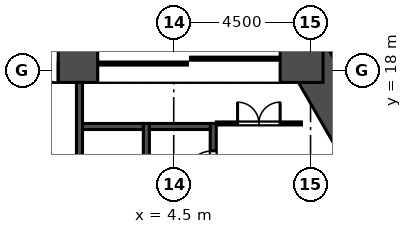
"""IFC4 building model, lengths in metres.
Left out: names, types, materials, properties, quantities, classifications, styles, units other than length and angle.
Written with IfcOpenShell. Run it as: python <this file> out.ifc"""

import sys

from ifc_helpers import new_model, si_unit, direction, frame, frame_2d, origin, place, context, subcontext, project, spatial, rectangle, extrude, element, fill, save


model = new_model("IFC4")
c1 = context("Model", 3, precision=1e-05, world=origin(), true_north=direction((0.0, 1.0)))
c2 = subcontext(c1, "Body", "Model", "MODEL_VIEW")
j1 = project(units=[si_unit("LENGTHUNIT", "METRE"), si_unit("PLANEANGLEUNIT", "RADIAN")], contexts=[c1])
p1 = place(None, origin())
s1 = spatial("IfcSite", under=j1, at=p1, CompositionType="ELEMENT")
p2 = place(p1, origin())
s2 = spatial("IfcBuilding", under=s1, at=p2, CompositionType="ELEMENT")
p3 = place(p2, frame((0.0, 0.0, 25.0)))
s3 = spatial("IfcBuildingStorey", under=s2, at=p3, CompositionType="ELEMENT", Elevation=25.0)
p4 = place(p3, frame((13.394, 10.703, 0.0), z_axis=(0.0, 0.0, 1.0), x_axis=(-0.50000187635, 0.866024320471, 0.0)))
e1 = element("IfcWall", 1, at=p4, inside=s3, PredefinedType="SHEAR", context=c2, shape_type="SweptSolid", body=[
    extrude(rectangle(XDim=9.177, YDim=1.4, at=frame_2d((4.588, 0.0))), origin(), (0.0, 0.0, 1.0), 4.5),
])
p5 = place(p3, frame((9.412, 18.3, 0.0), z_axis=(0.0, 0.0, 1.0), x_axis=(-1.0, 0.0, 0.0)))
e2 = element("IfcWall", 2, at=p5, inside=s3, PredefinedType="SHEAR", context=c2, shape_type="SweptSolid", body=[
    extrude(rectangle(XDim=18.823, YDim=1.4, at=frame_2d((9.412, 0.0))), origin(), (0.0, 0.0, 1.0), 4.5),
])
p6 = place(p5, frame((8.711, 0.0, 0.0)))
e3 = element("IfcOpeningElement", 3, at=p6, cuts=e2, PredefinedType="OPENING", context=c2, shape_type="SweptSolid", body=[
    extrude(rectangle(XDim=1.4, YDim=2.1, at=frame_2d((0.7, 1.05))), frame((0.0, 0.71, 0.0), z_axis=(0.0, -1.0, 0.0), x_axis=(1.0, 0.0, 0.0)), (0.0, 0.0, 1.0), 1.42),
])
p7 = place(p5, frame((11.412, 0.0, 0.0)))
e4 = element("IfcOpeningElement", 4, at=p7, cuts=e2, PredefinedType="OPENING", context=c2, shape_type="SweptSolid", body=[
    extrude(rectangle(XDim=6.0, YDim=2.4, at=frame_2d((3.0, 1.2))), frame((0.0, 0.71, 0.0), z_axis=(0.0, -1.0, 0.0), x_axis=(1.0, 0.0, 0.0)), (0.0, 0.0, 1.0), 1.42),
])
p8 = place(p5, frame((1.412, 0.0, 0.0)))
e5 = element("IfcOpeningElement", 5, at=p8, cuts=e2, PredefinedType="OPENING", context=c2, shape_type="SweptSolid", body=[
    extrude(rectangle(XDim=6.0, YDim=2.4, at=frame_2d((3.0, 1.2))), frame((0.0, 0.71, 0.0), z_axis=(0.0, -1.0, 0.0), x_axis=(1.0, 0.0, 0.0)), (0.0, 0.0, 1.0), 1.42),
])
p9 = place(p3, frame((32.353, 7.709, 0.0), z_axis=(0.0, 0.0, 1.0), x_axis=(-0.500000836325, 0.866024920931, 0.0)))
e6 = element("IfcWall", 6, at=p9, inside=s3, PredefinedType="SOLIDWALL", context=c2, shape_type="SweptSolid", body=[
    extrude(rectangle(XDim=56.0, YDim=0.34, at=frame_2d((28.0, 0.0))), origin(), (0.0, 0.0, 1.0), 4.2),
])
p10 = place(p9, frame((1.5, 0.0, 0.9)))
e7 = element("IfcOpeningElement", 7, at=p10, cuts=e6, PredefinedType="OPENING", context=c2, shape_type="SweptSolid", body=[
    extrude(rectangle(XDim=1.885, YDim=3.0, at=frame_2d((0.942, 1.5))), frame((0.0, 0.18, 0.0), z_axis=(0.0, -1.0, 0.0), x_axis=(1.0, 0.0, 0.0)), (0.0, 0.0, 1.0), 0.36),
])
p11 = place(p9, frame((4.5, 0.0, 0.9)))
e8 = element("IfcOpeningElement", 8, at=p11, cuts=e6, PredefinedType="OPENING", context=c2, shape_type="SweptSolid", body=[
    extrude(rectangle(XDim=1.885, YDim=3.0, at=frame_2d((0.942, 1.5))), frame((0.0, 0.18, 0.0), z_axis=(0.0, -1.0, 0.0), x_axis=(1.0, 0.0, 0.0)), (0.0, 0.0, 1.0), 0.36),
])
p12 = place(p9, frame((7.5, 0.0, 0.9)))
e9 = element("IfcOpeningElement", 9, at=p12, cuts=e6, PredefinedType="OPENING", context=c2, shape_type="SweptSolid", body=[
    extrude(rectangle(XDim=1.885, YDim=3.0, at=frame_2d((0.942, 1.5))), frame((0.0, 0.18, 0.0), z_axis=(0.0, -1.0, 0.0), x_axis=(1.0, 0.0, 0.0)), (0.0, 0.0, 1.0), 0.36),
])
p13 = place(p9, frame((10.5, 0.0, 0.9)))
e10 = element("IfcOpeningElement", 10, at=p13, cuts=e6, PredefinedType="OPENING", context=c2, shape_type="SweptSolid", body=[
    extrude(rectangle(XDim=1.885, YDim=3.0, at=frame_2d((0.942, 1.5))), frame((0.0, 0.18, 0.0), z_axis=(0.0, -1.0, 0.0), x_axis=(1.0, 0.0, 0.0)), (0.0, 0.0, 1.0), 0.36),
])
p14 = place(p9, frame((13.5, 0.0, 0.9)))
e11 = element("IfcOpeningElement", 11, at=p14, cuts=e6, PredefinedType="OPENING", context=c2, shape_type="SweptSolid", body=[
    extrude(rectangle(XDim=1.885, YDim=3.0, at=frame_2d((0.942, 1.5))), frame((0.0, 0.18, 0.0), z_axis=(0.0, -1.0, 0.0), x_axis=(1.0, 0.0, 0.0)), (0.0, 0.0, 1.0), 0.36),
])
p15 = place(p9, frame((16.5, 0.0, 0.9)))
e12 = element("IfcOpeningElement", 12, at=p15, cuts=e6, PredefinedType="OPENING", context=c2, shape_type="SweptSolid", body=[
    extrude(rectangle(XDim=1.885, YDim=3.0, at=frame_2d((0.942, 1.5))), frame((0.0, 0.18, 0.0), z_axis=(0.0, -1.0, 0.0), x_axis=(1.0, 0.0, 0.0)), (0.0, 0.0, 1.0), 0.36),
])
p16 = place(p9, frame((19.5, 0.0, 0.9)))
e13 = element("IfcOpeningElement", 13, at=p16, cuts=e6, PredefinedType="OPENING", context=c2, shape_type="SweptSolid", body=[
    extrude(rectangle(XDim=1.885, YDim=3.0, at=frame_2d((0.942, 1.5))), frame((0.0, 0.18, 0.0), z_axis=(0.0, -1.0, 0.0), x_axis=(1.0, 0.0, 0.0)), (0.0, 0.0, 1.0), 0.36),
])
p17 = place(p9, frame((22.5, 0.0, 0.9)))
e14 = element("IfcOpeningElement", 14, at=p17, cuts=e6, PredefinedType="OPENING", context=c2, shape_type="SweptSolid", body=[
    extrude(rectangle(XDim=1.885, YDim=3.0, at=frame_2d((0.942, 1.5))), frame((0.0, 0.18, 0.0), z_axis=(0.0, -1.0, 0.0), x_axis=(1.0, 0.0, 0.0)), (0.0, 0.0, 1.0), 0.36),
])
p18 = place(p9, frame((25.5, 0.0, 0.9)))
e15 = element("IfcOpeningElement", 15, at=p18, cuts=e6, PredefinedType="OPENING", context=c2, shape_type="SweptSolid", body=[
    extrude(rectangle(XDim=1.885, YDim=3.0, at=frame_2d((0.942, 1.5))), frame((0.0, 0.18, 0.0), z_axis=(0.0, -1.0, 0.0), x_axis=(1.0, 0.0, 0.0)), (0.0, 0.0, 1.0), 0.36),
])
p19 = place(p9, frame((28.5, 0.0, 0.9)))
e16 = element("IfcOpeningElement", 16, at=p19, cuts=e6, PredefinedType="OPENING", context=c2, shape_type="SweptSolid", body=[
    extrude(rectangle(XDim=1.885, YDim=3.0, at=frame_2d((0.942, 1.5))), frame((0.0, 0.18, 0.0), z_axis=(0.0, -1.0, 0.0), x_axis=(1.0, 0.0, 0.0)), (0.0, 0.0, 1.0), 0.36),
])
p20 = place(p9, frame((31.5, 0.0, 0.0)))
e17 = element("IfcOpeningElement", 17, at=p20, cuts=e6, PredefinedType="OPENING", context=c2, shape_type="SweptSolid", body=[
    extrude(rectangle(XDim=1.885, YDim=2.6, at=frame_2d((0.942, 1.3))), frame((0.0, 0.18, 0.0), z_axis=(0.0, -1.0, 0.0), x_axis=(1.0, 0.0, 0.0)), (0.0, 0.0, 1.0), 0.36),
])
p21 = place(p9, frame((34.5, 0.0, 0.9)))
e18 = element("IfcOpeningElement", 18, at=p21, cuts=e6, PredefinedType="OPENING", context=c2, shape_type="SweptSolid", body=[
    extrude(rectangle(XDim=1.885, YDim=3.0, at=frame_2d((0.942, 1.5))), frame((0.0, 0.18, 0.0), z_axis=(0.0, -1.0, 0.0), x_axis=(1.0, 0.0, 0.0)), (0.0, 0.0, 1.0), 0.36),
])
p22 = place(p9, frame((37.5, 0.0, 0.9)))
e19 = element("IfcOpeningElement", 19, at=p22, cuts=e6, PredefinedType="OPENING", context=c2, shape_type="SweptSolid", body=[
    extrude(rectangle(XDim=1.885, YDim=3.0, at=frame_2d((0.942, 1.5))), frame((0.0, 0.18, 0.0), z_axis=(0.0, -1.0, 0.0), x_axis=(1.0, 0.0, 0.0)), (0.0, 0.0, 1.0), 0.36),
])
p23 = place(p9, frame((40.5, 0.0, 0.9)))
e20 = element("IfcOpeningElement", 20, at=p23, cuts=e6, PredefinedType="OPENING", context=c2, shape_type="SweptSolid", body=[
    extrude(rectangle(XDim=1.885, YDim=3.0, at=frame_2d((0.942, 1.5))), frame((0.0, 0.18, 0.0), z_axis=(0.0, -1.0, 0.0), x_axis=(1.0, 0.0, 0.0)), (0.0, 0.0, 1.0), 0.36),
])
p24 = place(p9, frame((43.5, 0.0, 0.9)))
e21 = element("IfcOpeningElement", 21, at=p24, cuts=e6, PredefinedType="OPENING", context=c2, shape_type="SweptSolid", body=[
    extrude(rectangle(XDim=1.885, YDim=3.0, at=frame_2d((0.942, 1.5))), frame((0.0, 0.18, 0.0), z_axis=(0.0, -1.0, 0.0), x_axis=(1.0, 0.0, 0.0)), (0.0, 0.0, 1.0), 0.36),
])
p25 = place(p9, frame((46.5, 0.0, 0.9)))
e22 = element("IfcOpeningElement", 22, at=p25, cuts=e6, PredefinedType="OPENING", context=c2, shape_type="SweptSolid", body=[
    extrude(rectangle(XDim=1.885, YDim=3.0, at=frame_2d((0.942, 1.5))), frame((0.0, 0.18, 0.0), z_axis=(0.0, -1.0, 0.0), x_axis=(1.0, 0.0, 0.0)), (0.0, 0.0, 1.0), 0.36),
])
p26 = place(p9, frame((49.5, 0.0, 0.9)))
e23 = element("IfcOpeningElement", 23, at=p26, cuts=e6, PredefinedType="OPENING", context=c2, shape_type="SweptSolid", body=[
    extrude(rectangle(XDim=1.885, YDim=3.0, at=frame_2d((0.942, 1.5))), frame((0.0, 0.18, 0.0), z_axis=(0.0, -1.0, 0.0), x_axis=(1.0, 0.0, 0.0)), (0.0, 0.0, 1.0), 0.36),
])
p27 = place(p9, frame((52.5, 0.0, 0.9)))
e24 = element("IfcOpeningElement", 24, at=p27, cuts=e6, PredefinedType="OPENING", context=c2, shape_type="SweptSolid", body=[
    extrude(rectangle(XDim=1.885, YDim=3.0, at=frame_2d((0.942, 1.5))), frame((0.0, 0.18, 0.0), z_axis=(0.0, -1.0, 0.0), x_axis=(1.0, 0.0, 0.0)), (0.0, 0.0, 1.0), 0.36),
])
p28 = place(p3, frame((5.8, 8.25, -2.0), z_axis=(0.0, 0.0, 1.0), x_axis=(0.0, 1.0, 0.0)))
e25 = element("IfcWall", 25, at=p28, inside=s3, PredefinedType="SOLIDWALL", context=c2, shape_type="SweptSolid", body=[
    extrude(rectangle(XDim=8.0, YDim=0.2, at=frame_2d((4.0, 0.0))), origin(), (0.0, 0.0, 1.0), 6.2),
])
p29 = place(p28, frame((0.9, 0.0, 2.0)))
e26 = element("IfcOpeningElement", 26, at=p29, cuts=e25, PredefinedType="OPENING", context=c2, shape_type="SweptSolid", body=[
    extrude(rectangle(XDim=1.0, YDim=2.1, at=frame_2d((0.5, 1.05))), frame((0.0, 0.11, 0.0), z_axis=(0.0, -1.0, 0.0), x_axis=(1.0, 0.0, 0.0)), (0.0, 0.0, 1.0), 0.22),
])
p30 = place(p28, frame((3.5, 0.0, 2.0)))
e27 = element("IfcOpeningElement", 27, at=p30, cuts=e25, PredefinedType="OPENING", context=c2, shape_type="SweptSolid", body=[
    extrude(rectangle(XDim=1.0, YDim=2.1, at=frame_2d((0.5, 1.05))), frame((0.0, 0.11, 0.0), z_axis=(0.0, -1.0, 0.0), x_axis=(1.0, 0.0, 0.0)), (0.0, 0.0, 1.0), 0.22),
])
p31 = place(p28, frame((6.1, 0.0, 2.0)))
e28 = element("IfcOpeningElement", 28, at=p31, cuts=e25, PredefinedType="OPENING", context=c2, shape_type="SweptSolid", body=[
    extrude(rectangle(XDim=1.0, YDim=2.1, at=frame_2d((0.5, 1.05))), frame((0.0, 0.11, 0.0), z_axis=(0.0, -1.0, 0.0), x_axis=(1.0, 0.0, 0.0)), (0.0, 0.0, 1.0), 0.22),
])
p32 = place(p3, frame((3.6, 8.45, -2.0), z_axis=(0.0, 0.0, 1.0), x_axis=(0.0, 1.0, 0.0)))
e29 = element("IfcWall", 29, at=p32, inside=s3, PredefinedType="SOLIDWALL", context=c2, shape_type="SweptSolid", body=[
    extrude(rectangle(XDim=7.8, YDim=0.2, at=frame_2d((3.9, 0.0))), origin(), (0.0, 0.0, 1.0), 6.2),
])
p33 = place(p3, frame((1.4, 5.85, -2.0), z_axis=(0.0, 0.0, 1.0), x_axis=(0.0, 1.0, 0.0)))
e30 = element("IfcWall", 30, at=p33, inside=s3, PredefinedType="SOLIDWALL", context=c2, shape_type="SweptSolid", body=[
    extrude(rectangle(XDim=11.75, YDim=0.2, at=frame_2d((5.875, 0.0))), origin(), (0.0, 0.0, 1.0), 6.2),
])
p34 = place(p33, frame((0.65, 0.0, 2.0)))
e31 = element("IfcOpeningElement", 31, at=p34, cuts=e30, PredefinedType="OPENING", context=c2, shape_type="SweptSolid", body=[
    extrude(rectangle(XDim=1.1, YDim=2.1, at=frame_2d((0.55, 1.05))), frame((0.0, 0.11, 0.0), z_axis=(0.0, -1.0, 0.0), x_axis=(1.0, 0.0, 0.0)), (0.0, 0.0, 1.0), 0.22),
])
p35 = place(p33, frame((3.3, 0.0, 2.0)))
e32 = element("IfcOpeningElement", 32, at=p35, cuts=e30, PredefinedType="OPENING", context=c2, shape_type="SweptSolid", body=[
    extrude(rectangle(XDim=1.0, YDim=2.1, at=frame_2d((0.5, 1.05))), frame((0.0, 0.11, 0.0), z_axis=(0.0, -1.0, 0.0), x_axis=(1.0, 0.0, 0.0)), (0.0, 0.0, 1.0), 0.22),
])
for number, where, z_axis, x_axis in (
    (33, (3.7, 16.15, -2.0), (0.0, 0.0, 1.0), (1.0, 0.0, 0.0)),
    (34, (1.5, 16.15, -2.0), (0.0, 0.0, 1.0), (1.0, 0.0, 0.0)),
):
    element("IfcWall", number, at=place(p3, frame(where, z_axis=z_axis, x_axis=x_axis)), inside=s3, PredefinedType="SOLIDWALL", context=c2, shape_type="SweptSolid", body=[
        extrude(rectangle(XDim=2.0, YDim=0.2, at=frame_2d((1.0, 0.0))), origin(), (0.0, 0.0, 1.0), 6.2),
    ])
p36 = place(p3, frame((5.9, 16.25, 0.0), z_axis=(0.0, 0.0, 1.0), x_axis=(1.0, 0.0, 0.0)))
e35 = element("IfcWall", 35, at=p36, inside=s3, PredefinedType="PARTITIONING", context=c2, shape_type="SweptSolid", body=[
    extrude(rectangle(XDim=2.8, YDim=0.1, at=frame_2d((1.4, 0.0))), origin(), (0.0, 0.0, 1.0), 4.2),
])
p37 = place(p36, frame((0.7, 0.0, 0.0)))
e36 = element("IfcOpeningElement", 36, at=p37, cuts=e35, PredefinedType="OPENING", context=c2, shape_type="SweptSolid", body=[
    extrude(rectangle(XDim=1.4, YDim=2.1, at=frame_2d((0.7, 1.05))), frame((0.0, 0.06, 0.0), z_axis=(0.0, -1.0, 0.0), x_axis=(1.0, 0.0, 0.0)), (0.0, 0.0, 1.0), 0.12),
])
p38 = place(p31, origin())
e37 = element("IfcDoor", 37, at=p38, inside=s3, OperationType="SINGLE_SWING_LEFT", PredefinedType="DOOR", context=c2, shape_type="SweptSolid", body=[
    extrude(rectangle(XDim=1.0, YDim=2.1, at=frame_2d((0.5, 1.05))), frame((0.0, 0.025, 0.0), z_axis=(0.0, -1.0, 0.0), x_axis=(1.0, 0.0, 0.0)), (0.0, 0.0, 1.0), 0.05),
])
fill(e28, e37)
p39 = place(p37, origin())
e38 = element("IfcDoor", 38, at=p39, inside=s3, OperationType="DOUBLE_DOOR_SINGLE_SWING", PredefinedType="DOOR", context=c2, shape_type="SweptSolid", body=[
    extrude(rectangle(XDim=1.4, YDim=2.1, at=frame_2d((0.7, 1.05))), frame((0.0, 0.025, 0.0), z_axis=(0.0, -1.0, 0.0), x_axis=(1.0, 0.0, 0.0)), (0.0, 0.0, 1.0), 0.05),
])
fill(e36, e38)
p40 = place(p6, origin())
e39 = element("IfcDoor", 39, at=p40, inside=s3, OperationType="DOUBLE_DOOR_SINGLE_SWING", PredefinedType="DOOR", context=c2, shape_type="SweptSolid", body=[
    extrude(rectangle(XDim=1.4, YDim=2.1, at=frame_2d((0.7, 1.05))), frame((0.0, 0.025, 0.0), z_axis=(0.0, -1.0, 0.0), x_axis=(1.0, 0.0, 0.0)), (0.0, 0.0, 1.0), 0.05),
])
fill(e3, e39)
p41 = place(p8, origin())
e40 = element("IfcDoor", 40, at=p41, inside=s3, OperationType="DOUBLE_DOOR_SLIDING", PredefinedType="DOOR", context=c2, shape_type="SweptSolid", body=[
    extrude(rectangle(XDim=6.0, YDim=2.4, at=frame_2d((3.0, 1.2))), frame((0.0, 0.025, 0.0), z_axis=(0.0, -1.0, 0.0), x_axis=(1.0, 0.0, 0.0)), (0.0, 0.0, 1.0), 0.05),
])
fill(e5, e40)
save(model, sys.argv[1])
